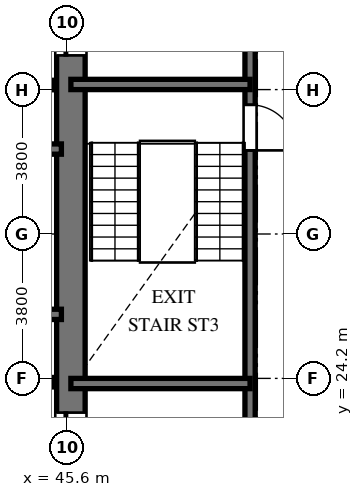
"""IFC4 building model, lengths in metres.
Left out: names, types, materials, properties, quantities, classifications, styles, units other than length and angle.
Written with IfcOpenShell. Run it as: python <this file> out.ifc"""

import sys

from ifc_helpers import new_model, si_unit, direction, frame, frame_2d, origin, place, context, subcontext, project, spatial, rectangle, extrude, element, fill, save


model = new_model("IFC4")
c1 = context("Model", 3, precision=1e-05, world=origin(), true_north=direction((0.0, 1.0)))
c2 = subcontext(c1, "Body", "Model", "MODEL_VIEW")
j1 = project(units=[si_unit("LENGTHUNIT", "METRE"), si_unit("PLANEANGLEUNIT", "RADIAN")], contexts=[c1])
p1 = place(None, origin())
s1 = spatial("IfcSite", under=j1, at=p1, CompositionType="ELEMENT")
p2 = place(p1, origin())
s2 = spatial("IfcBuilding", under=s1, at=p2, CompositionType="ELEMENT")
p3 = place(p2, frame((0.0, 0.0, 121.872)))
s3 = spatial("IfcBuildingStorey", under=s2, at=p3, CompositionType="ELEMENT", Elevation=121.872)
p4 = place(p3, frame((45.7, 20.95, 0.0), z_axis=(0.0, 0.0, 1.0), x_axis=(0.0, 1.0, 0.0)))
e1 = element("IfcWall", 1, at=p4, inside=s3, PredefinedType="SHEAR", context=c2, shape_type="SweptSolid", body=[
    extrude(rectangle(XDim=14.1, YDim=0.75, at=frame_2d((7.05, 0.0))), origin(), (0.0, 0.0, 1.0), 3.648),
])
p5 = place(p4, frame((11.75, 0.0, 0.0)))
e2 = element("IfcOpeningElement", 2, at=p5, cuts=e1, PredefinedType="OPENING", context=c2, shape_type="SweptSolid", body=[
    extrude(rectangle(XDim=1.4, YDim=2.3, at=frame_2d((0.7, 1.15))), frame((0.0, 0.385, 0.0), z_axis=(0.0, -1.0, 0.0), x_axis=(1.0, 0.0, 0.0)), (0.0, 0.0, 1.0), 0.77),
])
p6 = place(p4, frame((0.95, 0.0, 0.0)))
e3 = element("IfcOpeningElement", 3, at=p6, cuts=e1, PredefinedType="OPENING", context=c2, shape_type="SweptSolid", body=[
    extrude(rectangle(XDim=1.4, YDim=2.3, at=frame_2d((0.7, 1.15))), frame((0.0, 0.385, 0.0), z_axis=(0.0, -1.0, 0.0), x_axis=(1.0, 0.0, 0.0)), (0.0, 0.0, 1.0), 0.77),
])
p7 = place(p3, frame((37.465, 30.235, 0.0), z_axis=(0.0, 0.0, 1.0), x_axis=(1.0, 0.0, 0.0)))
e4 = element("IfcWall", 4, at=p7, inside=s3, PredefinedType="SHEAR", context=c2, shape_type="SweptSolid", body=[
    extrude(rectangle(XDim=7.985, YDim=0.27, at=frame_2d((3.992, 0.0))), origin(), (0.0, 0.0, 1.0), 3.648),
])
p8 = place(p7, frame((6.455, 0.0, 0.0)))
e5 = element("IfcOpeningElement", 5, at=p8, cuts=e4, PredefinedType="OPENING", context=c2, shape_type="SweptSolid", body=[
    extrude(rectangle(XDim=1.2, YDim=2.15, at=frame_2d((0.6, 1.075))), frame((0.0, 0.145, 0.0), z_axis=(0.0, -1.0, 0.0), x_axis=(1.0, 0.0, 0.0)), (0.0, 0.0, 1.0), 0.29),
])
p9 = place(p3, frame((37.465, 25.885, 0.0), z_axis=(0.0, 0.0, 1.0), x_axis=(1.0, 0.0, 0.0)))
e6 = element("IfcWall", 6, at=p9, inside=s3, PredefinedType="SHEAR", context=c2, shape_type="SweptSolid", body=[
    extrude(rectangle(XDim=7.985, YDim=0.27, at=frame_2d((3.992, 0.0))), origin(), (0.0, 0.0, 1.0), 3.648),
])
for number, where, z_axis, x_axis in (
    (7, (42.95, 31.92, 0.0), (0.0, 0.0, 1.0), (1.0, 0.0, 0.0)),
    (8, (42.95, 24.1, 0.0), (0.0, 0.0, 1.0), (1.0, 0.0, 0.0)),
):
    element("IfcWall", number, at=place(p3, frame(where, z_axis=z_axis, x_axis=x_axis)), inside=s3, PredefinedType="SOLIDWALL", context=c2, shape_type="SweptSolid", body=[
        extrude(rectangle(XDim=2.3, YDim=0.25, at=frame_2d((1.15, 0.0))), origin(), (0.0, 0.0, 1.0), 3.428),
    ])
p10 = place(p3, frame((50.415, 35.845, 0.0), z_axis=(0.0, 0.0, 1.0), x_axis=(0.0, -1.0, 0.0)))
e9 = element("IfcWall", 9, at=p10, inside=s3, PredefinedType="SHEAR", context=c2, shape_type="SweptSolid", body=[
    extrude(rectangle(XDim=15.825, YDim=0.27, at=frame_2d((7.913, 0.0))), origin(), (0.0, 0.0, 1.0), 3.648),
])
p11 = place(p10, frame((4.445, 0.0, 0.0)))
e10 = element("IfcOpeningElement", 10, at=p11, cuts=e9, PredefinedType="OPENING", context=c2, shape_type="SweptSolid", body=[
    extrude(rectangle(XDim=1.2, YDim=2.15, at=frame_2d((0.6, 1.075))), frame((0.0, 0.145, 0.0), z_axis=(0.0, -1.0, 0.0), x_axis=(1.0, 0.0, 0.0)), (0.0, 0.0, 1.0), 0.29),
])
p12 = place(p10, frame((1.295, 0.0, 0.0)))
e11 = element("IfcOpeningElement", 11, at=p12, cuts=e9, PredefinedType="OPENING", context=c2, shape_type="SweptSolid", body=[
    extrude(rectangle(XDim=1.3, YDim=2.2, at=frame_2d((0.65, 1.1))), frame((0.0, 0.145, 0.0), z_axis=(0.0, -1.0, 0.0), x_axis=(1.0, 0.0, 0.0)), (0.0, 0.0, 1.0), 0.29),
])
p13 = place(p10, frame((13.095, 0.0, 0.0)))
e12 = element("IfcOpeningElement", 12, at=p13, cuts=e9, PredefinedType="OPENING", context=c2, shape_type="SweptSolid", body=[
    extrude(rectangle(XDim=1.3, YDim=2.2, at=frame_2d((0.65, 1.1))), frame((0.0, 0.145, 0.0), z_axis=(0.0, -1.0, 0.0), x_axis=(1.0, 0.0, 0.0)), (0.0, 0.0, 1.0), 0.29),
])
for number, where, z_axis, x_axis in (
    (13, (45.7, 31.935, 0.0), (0.0, 0.0, 1.0), (1.0, 0.0, 0.0)),
    (14, (45.7, 24.065, 0.0), (0.0, 0.0, 1.0), (1.0, 0.0, 0.0)),
):
    element("IfcWall", number, at=place(p3, frame(where, z_axis=z_axis, x_axis=x_axis)), inside=s3, PredefinedType="SHEAR", context=c2, shape_type="SweptSolid", body=[
        extrude(rectangle(XDim=4.715, YDim=0.27, at=frame_2d((2.357, 0.0))), origin(), (0.0, 0.0, 1.0), 3.648),
    ])
p14 = place(p5, origin())
e15 = element("IfcDoor", 15, at=p14, inside=s3, OperationType="SLIDING_TO_LEFT", PredefinedType="DOOR", context=c2, shape_type="SweptSolid", body=[
    extrude(rectangle(XDim=1.4, YDim=2.3, at=frame_2d((0.7, 1.15))), frame((0.0, 0.025, 0.0), z_axis=(0.0, -1.0, 0.0), x_axis=(1.0, 0.0, 0.0)), (0.0, 0.0, 1.0), 0.05),
])
fill(e2, e15)
p15 = place(p6, origin())
e16 = element("IfcDoor", 16, at=p15, inside=s3, OperationType="SLIDING_TO_LEFT", PredefinedType="DOOR", context=c2, shape_type="SweptSolid", body=[
    extrude(rectangle(XDim=1.4, YDim=2.3, at=frame_2d((0.7, 1.15))), frame((0.0, 0.025, 0.0), z_axis=(0.0, -1.0, 0.0), x_axis=(1.0, 0.0, 0.0)), (0.0, 0.0, 1.0), 0.05),
])
fill(e3, e16)
p16 = place(p11, origin())
e17 = element("IfcDoor", 17, at=p16, inside=s3, OperationType="SINGLE_SWING_RIGHT", PredefinedType="DOOR", context=c2, shape_type="SweptSolid", body=[
    extrude(rectangle(XDim=1.2, YDim=2.15, at=frame_2d((0.6, 1.075))), frame((0.0, 0.025, 0.0), z_axis=(0.0, -1.0, 0.0), x_axis=(1.0, 0.0, 0.0)), (0.0, 0.0, 1.0), 0.05),
])
fill(e10, e17)
save(model, sys.argv[1])
